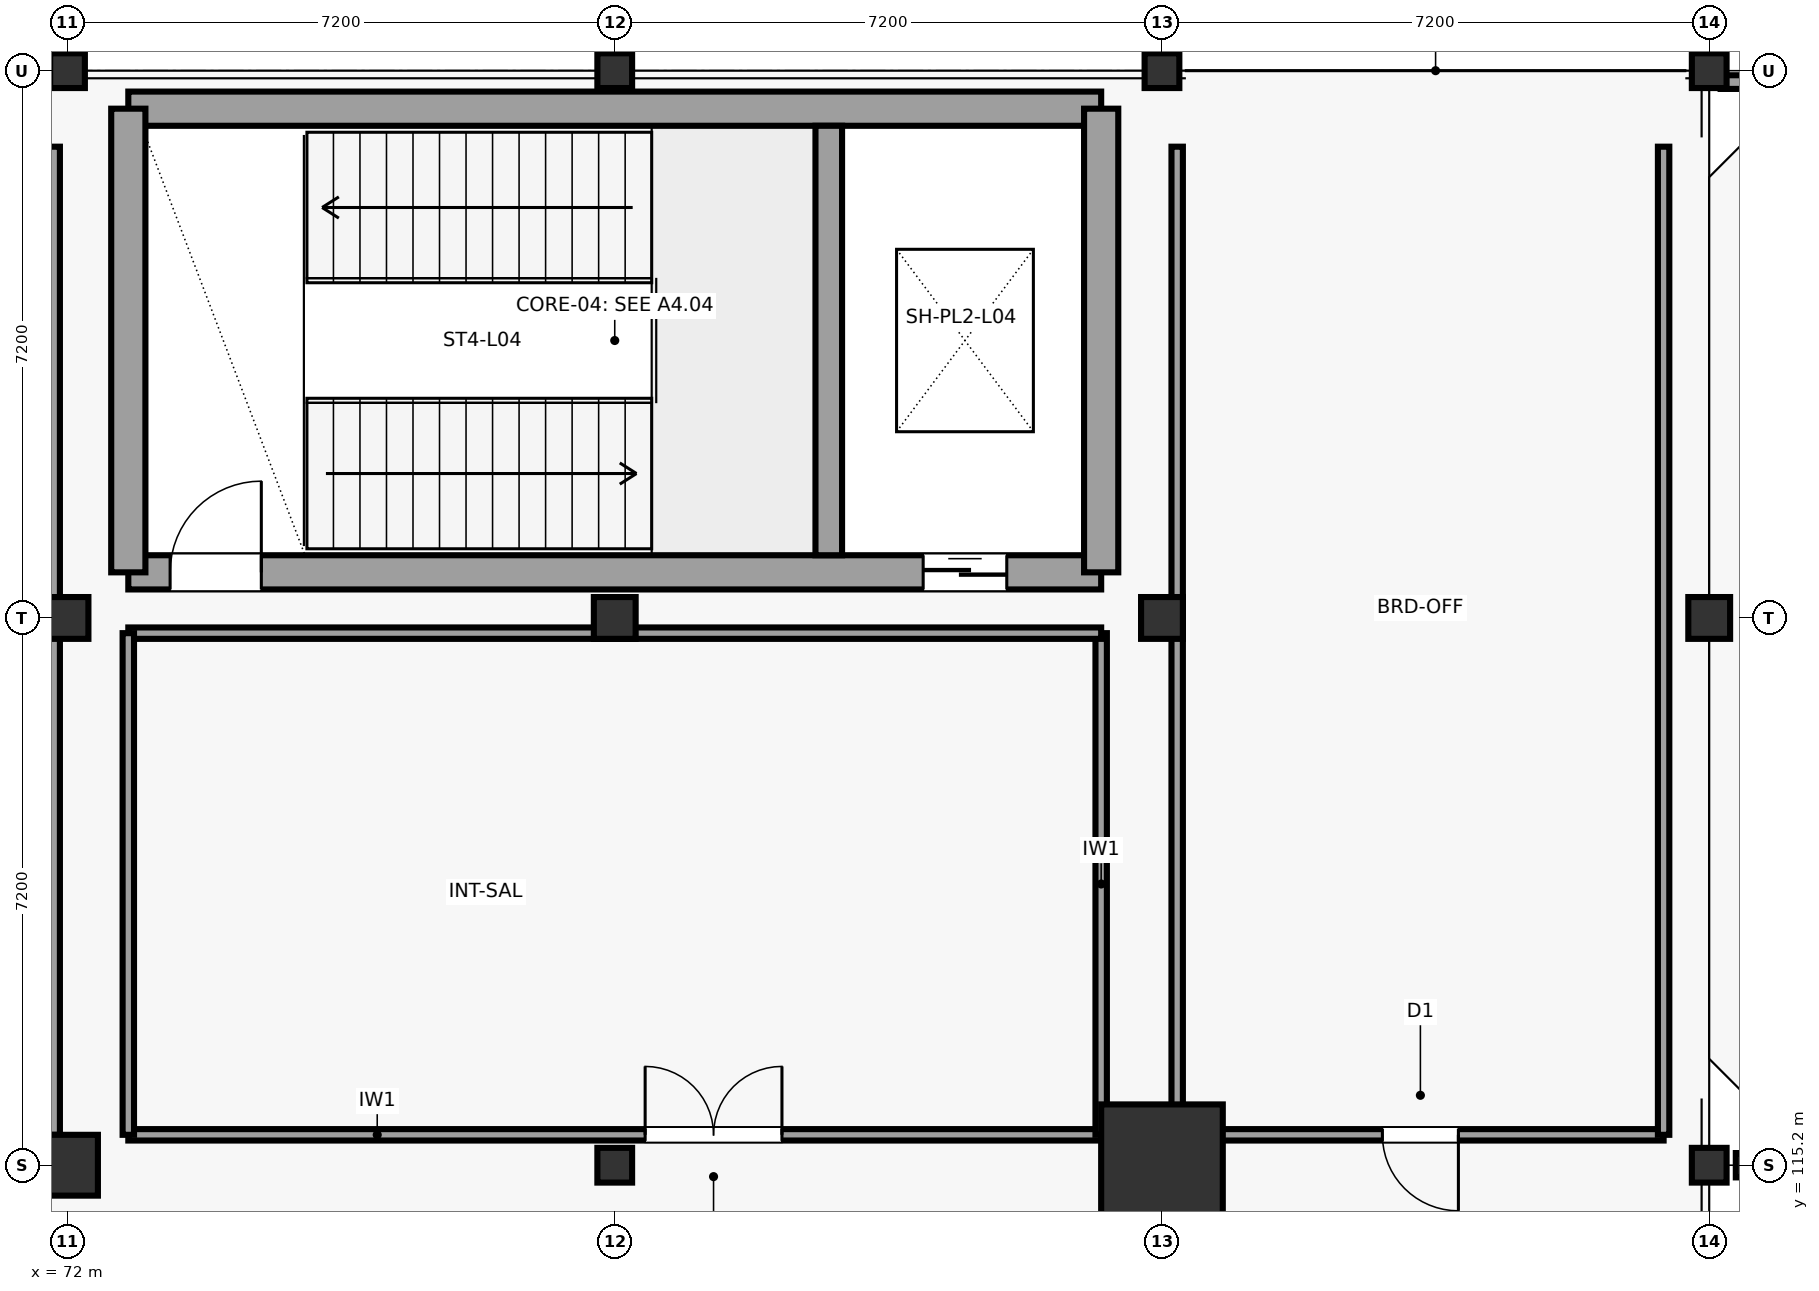
"""IFC4 building model, lengths in metres.
Left out: names, types, materials, properties, quantities, classifications, styles, units other than length and angle.
Written with IfcOpenShell. Run it as: python <this file> out.ifc"""

import sys

from ifc_helpers import new_model, si_unit, direction, frame, frame_2d, origin, origin_2d, place, context, subcontext, project, spatial, rectangle, circle, hollow_circle, extrude, element, fill, save


model = new_model("IFC4")
c1 = context("Model", 3, precision=1e-05, world=origin(), true_north=direction((0.0, 1.0)))
c2 = subcontext(c1, "Body", "Model", "MODEL_VIEW")
j1 = project(units=[si_unit("LENGTHUNIT", "METRE"), si_unit("PLANEANGLEUNIT", "RADIAN")], contexts=[c1])
p1 = place(None, origin())
s1 = spatial("IfcSite", under=j1, at=p1, CompositionType="ELEMENT")
p2 = place(p1, origin())
s2 = spatial("IfcBuilding", under=s1, at=p2, CompositionType="ELEMENT")
p3 = place(p2, frame((0.0, 0.0, 18.6)))
s3 = spatial("IfcBuildingStorey", under=s2, at=p3, CompositionType="ELEMENT", Elevation=18.6)
p4 = place(p3, frame((72.0, 115.2, 0.0), z_axis=(0.0, 0.0, 1.0), x_axis=(1.0, 0.0, 0.0)))
e1 = element("IfcColumn", 1, at=p4, inside=s3, PredefinedType="COLUMN", context=c2, shape_type="SweptSolid", body=[
    extrude(circle(Radius=0.4, at=origin_2d()), origin(), (0.0, 0.0, 1.0), 4.4),
])
p5 = place(p3, frame((72.0, 122.4, 0.0), z_axis=(0.0, 0.0, 1.0), x_axis=(1.0, 0.0, 0.0)))
e2 = element("IfcColumn", 2, at=p5, inside=s3, PredefinedType="COLUMN", context=c2, shape_type="SweptSolid", body=[
    extrude(rectangle(XDim=0.55, YDim=0.55, at=origin_2d()), origin(), (0.0, 0.0, 1.0), 4.4),
])
for number, where, z_axis, x_axis in (
    (3, (72.0, 129.6, 0.0), (0.0, 0.0, 1.0), (1.0, 0.0, 0.0)),
    (4, (79.2, 115.2, 0.0), (0.0, 0.0, 1.0), (1.0, 0.0, 0.0)),
):
    element("IfcColumn", number, at=place(p3, frame(where, z_axis=z_axis, x_axis=x_axis)), inside=s3, PredefinedType="COLUMN", context=c2, shape_type="SweptSolid", body=[
        extrude(hollow_circle(Radius=0.229, WallThickness=0.02, at=origin_2d()), origin(), (0.0, 0.0, 1.0), 4.4),
    ])
p6 = place(p3, frame((79.2, 122.4, 0.0), z_axis=(0.0, 0.0, 1.0), x_axis=(1.0, 0.0, 0.0)))
e5 = element("IfcColumn", 5, at=p6, inside=s3, PredefinedType="COLUMN", context=c2, shape_type="SweptSolid", body=[
    extrude(rectangle(XDim=0.55, YDim=0.55, at=origin_2d()), origin(), (0.0, 0.0, 1.0), 4.4),
])
p7 = place(p3, frame((79.2, 129.6, 0.0), z_axis=(0.0, 0.0, 1.0), x_axis=(1.0, 0.0, 0.0)))
e6 = element("IfcColumn", 6, at=p7, inside=s3, PredefinedType="COLUMN", context=c2, shape_type="SweptSolid", body=[
    extrude(hollow_circle(Radius=0.229, WallThickness=0.02, at=origin_2d()), origin(), (0.0, 0.0, 1.0), 4.4),
])
p8 = place(p3, frame((86.4, 115.2, 0.0), z_axis=(0.0, 0.0, 1.0), x_axis=(1.0, 0.0, 0.0)))
e7 = element("IfcColumn", 7, at=p8, inside=s3, PredefinedType="COLUMN", context=c2, shape_type="SweptSolid", body=[
    extrude(circle(Radius=0.8, at=origin_2d()), origin(), (0.0, 0.0, 1.0), 4.4),
])
p9 = place(p3, frame((86.4, 122.4, 0.0), z_axis=(0.0, 0.0, 1.0), x_axis=(1.0, 0.0, 0.0)))
e8 = element("IfcColumn", 8, at=p9, inside=s3, PredefinedType="COLUMN", context=c2, shape_type="SweptSolid", body=[
    extrude(rectangle(XDim=0.55, YDim=0.55, at=origin_2d()), origin(), (0.0, 0.0, 1.0), 4.4),
])
for number, where, z_axis, x_axis in (
    (9, (86.4, 129.6, 0.0), (0.0, 0.0, 1.0), (1.0, 0.0, 0.0)),
    (10, (93.6, 115.2, 0.0), (0.0, 0.0, 1.0), (1.0, 0.0, 0.0)),
):
    element("IfcColumn", number, at=place(p3, frame(where, z_axis=z_axis, x_axis=x_axis)), inside=s3, PredefinedType="COLUMN", context=c2, shape_type="SweptSolid", body=[
        extrude(hollow_circle(Radius=0.229, WallThickness=0.02, at=origin_2d()), origin(), (0.0, 0.0, 1.0), 4.4),
    ])
p10 = place(p3, frame((93.6, 122.4, 0.0), z_axis=(0.0, 0.0, 1.0), x_axis=(1.0, 0.0, 0.0)))
e11 = element("IfcColumn", 11, at=p10, inside=s3, PredefinedType="COLUMN", context=c2, shape_type="SweptSolid", body=[
    extrude(rectangle(XDim=0.55, YDim=0.55, at=origin_2d()), origin(), (0.0, 0.0, 1.0), 4.4),
])
p11 = place(p3, frame((93.6, 129.6, 0.0), z_axis=(0.0, 0.0, 1.0), x_axis=(1.0, 0.0, 0.0)))
e12 = element("IfcColumn", 12, at=p11, inside=s3, PredefinedType="COLUMN", context=c2, shape_type="SweptSolid", body=[
    extrude(hollow_circle(Radius=0.229, WallThickness=0.02, at=origin_2d()), origin(), (0.0, 0.0, 1.0), 4.4),
])
p12 = place(p3, frame((72.8, 123.0, 0.0), z_axis=(0.0, 0.0, 1.0), x_axis=(1.0, 0.0, 0.0)))
e13 = element("IfcWall", 13, at=p12, inside=s3, PredefinedType="SHEAR", context=c2, shape_type="SweptSolid", body=[
    extrude(rectangle(XDim=12.8, YDim=0.45, at=frame_2d((6.4, 0.0))), origin(), (0.0, 0.0, 1.0), 4.15),
])
p13 = place(p12, frame((0.55, 0.0, 0.0)))
e14 = element("IfcOpeningElement", 14, at=p13, cuts=e13, PredefinedType="OPENING", context=c2, shape_type="SweptSolid", body=[
    extrude(rectangle(XDim=1.2, YDim=2.25, at=frame_2d((0.6, 1.125))), frame((0.0, 0.235, 0.0), z_axis=(0.0, -1.0, 0.0), x_axis=(1.0, 0.0, 0.0)), (0.0, 0.0, 1.0), 0.47),
])
p14 = place(p12, frame((10.458, 0.0, 0.0)))
e15 = element("IfcOpeningElement", 15, at=p14, cuts=e13, PredefinedType="OPENING", context=c2, shape_type="SweptSolid", body=[
    extrude(rectangle(XDim=1.1, YDim=2.2, at=frame_2d((0.55, 1.1))), frame((0.0, 0.235, 0.0), z_axis=(0.0, -1.0, 0.0), x_axis=(1.0, 0.0, 0.0)), (0.0, 0.0, 1.0), 0.47),
])
p15 = place(p3, frame((72.8, 129.1, 0.0), z_axis=(0.0, 0.0, 1.0), x_axis=(1.0, 0.0, 0.0)))
e16 = element("IfcWall", 16, at=p15, inside=s3, PredefinedType="SHEAR", context=c2, shape_type="SweptSolid", body=[
    extrude(rectangle(XDim=12.8, YDim=0.45, at=frame_2d((6.4, 0.0))), origin(), (0.0, 0.0, 1.0), 4.15),
])
for number, where, z_axis, x_axis in (
    (17, (72.8, 123.0, 0.0), (0.0, 0.0, 1.0), (0.0, 1.0, 0.0)),
    (18, (85.6, 123.0, 0.0), (0.0, 0.0, 1.0), (0.0, 1.0, 0.0)),
):
    element("IfcWall", number, at=place(p3, frame(where, z_axis=z_axis, x_axis=x_axis)), inside=s3, PredefinedType="SHEAR", context=c2, shape_type="SweptSolid", body=[
        extrude(rectangle(XDim=6.1, YDim=0.45, at=frame_2d((3.05, 0.0))), origin(), (0.0, 0.0, 1.0), 4.15),
    ])
p16 = place(p3, frame((82.016, 123.225, 0.0), z_axis=(0.0, 0.0, 1.0), x_axis=(0.0, 1.0, 0.0)))
e19 = element("IfcWall", 19, at=p16, inside=s3, PredefinedType="SHEAR", context=c2, shape_type="SweptSolid", body=[
    extrude(rectangle(XDim=5.65, YDim=0.35, at=frame_2d((2.825, 0.0))), origin(), (0.0, 0.0, 1.0), 4.15),
])
p17 = place(p3, frame((93.95, 115.2, 0.0), z_axis=(0.0, 0.0, 1.0), x_axis=(1.0, 0.0, 0.0)))
e20 = element("IfcWall", 20, at=p17, inside=s3, PredefinedType="SOLIDWALL", context=c2, shape_type="SweptSolid", body=[
    extrude(rectangle(XDim=13.7, YDim=0.32, at=frame_2d((6.85, 0.0))), origin(), (0.0, 0.0, 1.0), 3.21),
])
p18 = place(p3, frame((93.75, 129.45, 0.0), z_axis=(0.0, 0.0, 1.0), x_axis=(1.0, 0.0, 0.0)))
e21 = element("IfcWall", 21, at=p18, inside=s3, PredefinedType="PARAPET", context=c2, shape_type="SweptSolid", body=[
    extrude(rectangle(XDim=28.5, YDim=0.18, at=frame_2d((14.25, 0.0))), origin(), (0.0, 0.0, 1.0), 1.15),
])
p19 = place(p3, frame((71.8, 115.6, 0.0), z_axis=(0.0, 0.0, 1.0), x_axis=(0.0, 1.0, 0.0)))
e22 = element("IfcWall", 22, at=p19, inside=s3, PredefinedType="PARTITIONING", context=c2, shape_type="SweptSolid", body=[
    extrude(rectangle(XDim=13.0, YDim=0.2, at=frame_2d((6.5, 0.0))), origin(), (0.0, 0.0, 1.0), 3.21),
])
p20 = place(p3, frame((72.8, 115.6, 0.0), z_axis=(0.0, 0.0, 1.0), x_axis=(1.0, 0.0, 0.0)))
e23 = element("IfcWall", 23, at=p20, inside=s3, PredefinedType="PARTITIONING", context=c2, shape_type="SweptSolid", body=[
    extrude(rectangle(XDim=12.8, YDim=0.15, at=frame_2d((6.4, 0.0))), origin(), (0.0, 0.0, 1.0), 3.21),
])
p21 = place(p20, frame((6.8, 0.0, 0.0)))
e24 = element("IfcOpeningElement", 24, at=p21, cuts=e23, PredefinedType="OPENING", context=c2, shape_type="SweptSolid", body=[
    extrude(rectangle(XDim=1.8, YDim=2.3, at=frame_2d((0.9, 1.15))), frame((0.0, 0.085, 0.0), z_axis=(0.0, -1.0, 0.0), x_axis=(1.0, 0.0, 0.0)), (0.0, 0.0, 1.0), 0.17),
])
p22 = place(p3, frame((85.6, 115.6, 0.0), z_axis=(0.0, 0.0, 1.0), x_axis=(0.0, 1.0, 0.0)))
e25 = element("IfcWall", 25, at=p22, inside=s3, PredefinedType="PARTITIONING", context=c2, shape_type="SweptSolid", body=[
    extrude(rectangle(XDim=6.6, YDim=0.15, at=frame_2d((3.3, 0.0))), origin(), (0.0, 0.0, 1.0), 3.21),
])
p23 = place(p3, frame((85.6, 122.2, 0.0), z_axis=(0.0, 0.0, 1.0), x_axis=(-1.0, 0.0, 0.0)))
e26 = element("IfcWall", 26, at=p23, inside=s3, PredefinedType="PARTITIONING", context=c2, shape_type="SweptSolid", body=[
    extrude(rectangle(XDim=12.8, YDim=0.15, at=frame_2d((6.4, 0.0))), origin(), (0.0, 0.0, 1.0), 3.21),
])
p24 = place(p3, frame((72.8, 122.2, 0.0), z_axis=(0.0, 0.0, 1.0), x_axis=(0.0, -1.0, 0.0)))
e27 = element("IfcWall", 27, at=p24, inside=s3, PredefinedType="PARTITIONING", context=c2, shape_type="SweptSolid", body=[
    extrude(rectangle(XDim=6.6, YDim=0.15, at=frame_2d((3.3, 0.0))), origin(), (0.0, 0.0, 1.0), 3.21),
])
p25 = place(p3, frame((86.6, 115.6, 0.0), z_axis=(0.0, 0.0, 1.0), x_axis=(1.0, 0.0, 0.0)))
e28 = element("IfcWall", 28, at=p25, inside=s3, PredefinedType="PARTITIONING", context=c2, shape_type="SweptSolid", body=[
    extrude(rectangle(XDim=6.4, YDim=0.15, at=frame_2d((3.2, 0.0))), origin(), (0.0, 0.0, 1.0), 3.21),
])
p26 = place(p25, frame((2.7, 0.0, 0.0)))
e29 = element("IfcOpeningElement", 29, at=p26, cuts=e28, PredefinedType="OPENING", context=c2, shape_type="SweptSolid", body=[
    extrude(rectangle(XDim=1.0, YDim=2.2, at=frame_2d((0.5, 1.1))), frame((0.0, 0.085, 0.0), z_axis=(0.0, -1.0, 0.0), x_axis=(1.0, 0.0, 0.0)), (0.0, 0.0, 1.0), 0.17),
])
for number, where, z_axis, x_axis in (
    (30, (93.0, 115.6, 0.0), (0.0, 0.0, 1.0), (0.0, 1.0, 0.0)),
    (31, (86.6, 128.6, 0.0), (0.0, 0.0, 1.0), (0.0, -1.0, 0.0)),
):
    element("IfcWall", number, at=place(p3, frame(where, z_axis=z_axis, x_axis=x_axis)), inside=s3, PredefinedType="PARTITIONING", context=c2, shape_type="SweptSolid", body=[
        extrude(rectangle(XDim=13.0, YDim=0.15, at=frame_2d((6.5, 0.0))), origin(), (0.0, 0.0, 1.0), 3.21),
    ])
p27 = place(p13, origin())
e32 = element("IfcDoor", 32, at=p27, inside=s3, OperationType="SINGLE_SWING_RIGHT", PredefinedType="DOOR", context=c2, shape_type="SweptSolid", body=[
    extrude(rectangle(XDim=1.2, YDim=2.25, at=frame_2d((0.6, 1.125))), frame((0.0, 0.025, 0.0), z_axis=(0.0, -1.0, 0.0), x_axis=(1.0, 0.0, 0.0)), (0.0, 0.0, 1.0), 0.05),
])
fill(e14, e32)
p28 = place(p14, origin())
e33 = element("IfcDoor", 33, at=p28, inside=s3, OperationType="SLIDING_TO_RIGHT", PredefinedType="DOOR", context=c2, shape_type="SweptSolid", body=[
    extrude(rectangle(XDim=1.1, YDim=2.2, at=frame_2d((0.55, 1.1))), frame((0.0, 0.025, 0.0), z_axis=(0.0, -1.0, 0.0), x_axis=(1.0, 0.0, 0.0)), (0.0, 0.0, 1.0), 0.05),
])
fill(e15, e33)
p29 = place(p21, origin())
e34 = element("IfcDoor", 34, at=p29, inside=s3, OperationType="DOUBLE_DOOR_SINGLE_SWING", PredefinedType="DOOR", context=c2, shape_type="SweptSolid", body=[
    extrude(rectangle(XDim=1.8, YDim=2.3, at=frame_2d((0.9, 1.15))), frame((0.0, 0.025, 0.0), z_axis=(0.0, -1.0, 0.0), x_axis=(1.0, 0.0, 0.0)), (0.0, 0.0, 1.0), 0.05),
])
fill(e24, e34)
p30 = place(p26, frame((1.0, 0.0, 0.0), z_axis=(0.0, 0.0, 1.0), x_axis=(-1.0, 0.0, 0.0)))
e35 = element("IfcDoor", 35, at=p30, inside=s3, OperationType="SINGLE_SWING_RIGHT", PredefinedType="DOOR", context=c2, shape_type="SweptSolid", body=[
    extrude(rectangle(XDim=1.0, YDim=2.2, at=frame_2d((0.5, 1.1))), frame((0.0, 0.025, 0.0), z_axis=(0.0, -1.0, 0.0), x_axis=(1.0, 0.0, 0.0)), (0.0, 0.0, 1.0), 0.05),
])
fill(e29, e35)
save(model, sys.argv[1])
